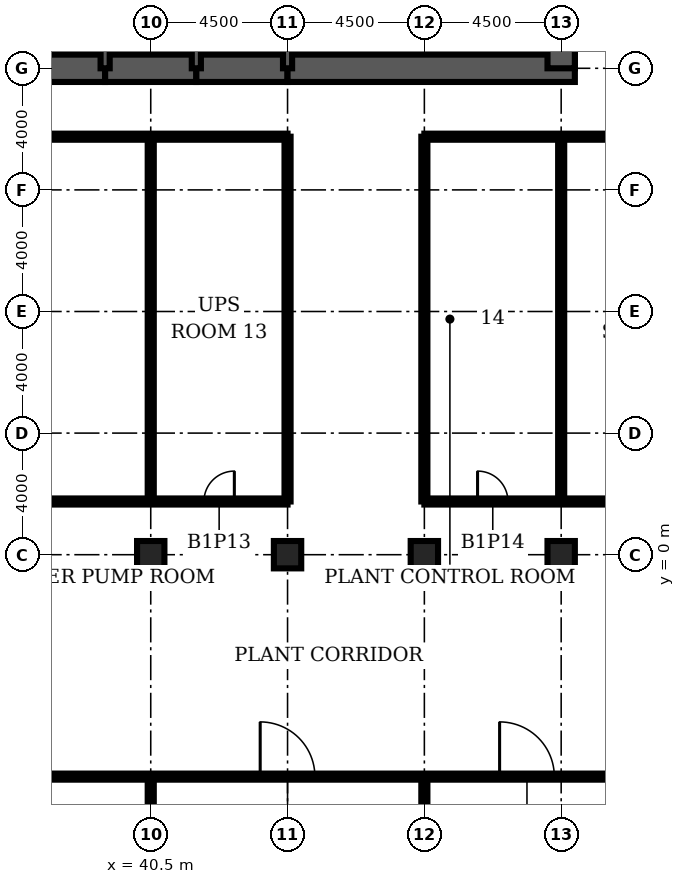
"""IFC4 building model, lengths in metres.
Left out: names, types, materials, properties, quantities, classifications, styles, units other than length and angle.
Written with IfcOpenShell. Run it as: python <this file> out.ifc"""

import sys

from ifc_helpers import new_model, si_unit, direction, frame, frame_2d, origin, origin_2d, place, context, subcontext, project, spatial, rectangle, hollow_rectangle, extrude, element, fill, save


model = new_model("IFC4")
c1 = context("Model", 3, precision=1e-05, world=origin(), true_north=direction((0.0, 1.0)))
c2 = subcontext(c1, "Body", "Model", "MODEL_VIEW")
j1 = project(units=[si_unit("LENGTHUNIT", "METRE"), si_unit("PLANEANGLEUNIT", "RADIAN")], contexts=[c1])
p1 = place(None, origin())
s1 = spatial("IfcSite", under=j1, at=p1, CompositionType="ELEMENT")
p2 = place(p1, origin())
s2 = spatial("IfcBuilding", under=s1, at=p2, CompositionType="ELEMENT")
p3 = place(p2, frame((0.0, 0.0, -6.0)))
s3 = spatial("IfcBuildingStorey", under=s2, at=p3, CompositionType="ELEMENT", Elevation=-6.0)
for number, where, z_axis, x_axis in (
    (1, (40.5, 0.0, 0.0), (0.0, 0.0, 1.0), (0.0, 1.0, 0.0)),
    (2, (45.0, 0.0, 0.0), (0.0, 0.0, 1.0), (0.0, 1.0, 0.0)),
    (3, (49.5, 0.0, 0.0), (0.0, 0.0, 1.0), (0.0, 1.0, 0.0)),
    (4, (54.0, 0.0, 0.0), (0.0, 0.0, 1.0), (0.0, 1.0, 0.0)),
):
    element("IfcColumn", number, at=place(p3, frame(where, z_axis=z_axis, x_axis=x_axis)), inside=s3, PredefinedType="COLUMN", context=c2, shape_type="SweptSolid", body=[
        extrude(hollow_rectangle(XDim=0.9, YDim=0.9, WallThickness=0.12, at=origin_2d()), origin(), (0.0, 0.0, 1.0), 6.0),
    ])
for number, where, z_axis, x_axis in (
    (5, (36.0, 16.0, 0.0), (0.0, 0.0, 1.0), (1.0, 0.0, 0.0)),
    (6, (39.0, 16.0, 0.0), (0.0, 0.0, 1.0), (1.0, 0.0, 0.0)),
    (7, (42.0, 16.0, 0.0), (0.0, 0.0, 1.0), (1.0, 0.0, 0.0)),
):
    element("IfcWall", number, at=place(p3, frame(where, z_axis=z_axis, x_axis=x_axis)), inside=s3, PredefinedType="SHEAR", context=c2, shape_type="SweptSolid", body=[
        extrude(rectangle(XDim=3.0, YDim=0.9, at=frame_2d((1.5, 0.0))), origin(), (0.0, 0.0, 1.0), 6.0),
    ])
p4 = place(p3, frame((45.0, 16.0, 0.0), z_axis=(0.0, 0.0, 1.0), x_axis=(1.0, 0.0, 0.0)))
e8 = element("IfcWall", 8, at=p4, inside=s3, PredefinedType="SHEAR", context=c2, shape_type="SweptSolid", body=[
    extrude(rectangle(XDim=9.45, YDim=0.9, at=frame_2d((4.725, 0.0))), origin(), (0.0, 0.0, 1.0), 6.0),
])
p5 = place(p3, frame((54.0, 16.0, 0.0), z_axis=(0.0, 0.0, 1.0), x_axis=(0.0, 1.0, 0.0)))
e9 = element("IfcWall", 9, at=p5, inside=s3, PredefinedType="SHEAR", context=c2, shape_type="SweptSolid", body=[
    extrude(rectangle(XDim=3.2, YDim=0.9, at=frame_2d((1.6, 0.0))), origin(), (0.0, 0.0, 1.0), 6.0),
])
for number, where, z_axis, x_axis in (
    (10, (39.0, 16.0, 0.0), (0.0, 0.0, 1.0), (0.0, 1.0, 0.0)),
    (11, (42.0, 16.0, 0.0), (0.0, 0.0, 1.0), (0.0, 1.0, 0.0)),
    (12, (45.0, 16.0, 0.0), (0.0, 0.0, 1.0), (0.0, 1.0, 0.0)),
):
    element("IfcWall", number, at=place(p3, frame(where, z_axis=z_axis, x_axis=x_axis)), inside=s3, PredefinedType="SOLIDWALL", context=c2, shape_type="SweptSolid", body=[
        extrude(rectangle(XDim=3.2, YDim=0.3, at=frame_2d((1.6, 0.0))), origin(), (0.0, 0.0, 1.0), 6.0),
    ])
p6 = place(p3, frame((-0.59, -7.3, 0.0), z_axis=(0.0, 0.0, 1.0), x_axis=(1.0, 0.0, 0.0)))
e13 = element("IfcWall", 13, at=p6, inside=s3, PredefinedType="PARTITIONING", context=c2, shape_type="SweptSolid", body=[
    extrude(rectangle(XDim=73.18, YDim=0.2, at=frame_2d((36.59, 0.0))), origin(), (0.0, 0.0, 1.0), 5.7),
])
p7 = place(p6, frame((11.84, 0.0, 0.0)))
e14 = element("IfcOpeningElement", 14, at=p7, cuts=e13, PredefinedType="OPENING", context=c2, shape_type="SweptSolid", body=[
    extrude(rectangle(XDim=1.8, YDim=2.1, at=frame_2d((0.9, 1.05))), frame((0.0, 0.11, 0.0), z_axis=(0.0, -1.0, 0.0), x_axis=(1.0, 0.0, 0.0)), (0.0, 0.0, 1.0), 0.22),
])
p8 = place(p6, frame((64.04, 0.0, 0.0)))
e15 = element("IfcOpeningElement", 15, at=p8, cuts=e13, PredefinedType="OPENING", context=c2, shape_type="SweptSolid", body=[
    extrude(rectangle(XDim=1.8, YDim=2.1, at=frame_2d((0.9, 1.05))), frame((0.0, 0.11, 0.0), z_axis=(0.0, -1.0, 0.0), x_axis=(1.0, 0.0, 0.0)), (0.0, 0.0, 1.0), 0.22),
])
p9 = place(p6, frame((15.44, 0.0, 0.0)))
e16 = element("IfcOpeningElement", 16, at=p9, cuts=e13, PredefinedType="OPENING", context=c2, shape_type="SweptSolid", body=[
    extrude(rectangle(XDim=1.8, YDim=2.1, at=frame_2d((0.9, 1.05))), frame((0.0, 0.11, 0.0), z_axis=(0.0, -1.0, 0.0), x_axis=(1.0, 0.0, 0.0)), (0.0, 0.0, 1.0), 0.22),
])
p10 = place(p6, frame((19.04, 0.0, 0.0)))
e17 = element("IfcOpeningElement", 17, at=p10, cuts=e13, PredefinedType="OPENING", context=c2, shape_type="SweptSolid", body=[
    extrude(rectangle(XDim=1.8, YDim=2.1, at=frame_2d((0.9, 1.05))), frame((0.0, 0.11, 0.0), z_axis=(0.0, -1.0, 0.0), x_axis=(1.0, 0.0, 0.0)), (0.0, 0.0, 1.0), 0.22),
])
p11 = place(p6, frame((35.69, 0.0, 0.0)))
e18 = element("IfcOpeningElement", 18, at=p11, cuts=e13, PredefinedType="OPENING", context=c2, shape_type="SweptSolid", body=[
    extrude(rectangle(XDim=1.8, YDim=2.1, at=frame_2d((0.9, 1.05))), frame((0.0, 0.11, 0.0), z_axis=(0.0, -1.0, 0.0), x_axis=(1.0, 0.0, 0.0)), (0.0, 0.0, 1.0), 0.22),
])
p12 = place(p6, frame((44.69, 0.0, 0.0)))
e19 = element("IfcOpeningElement", 19, at=p12, cuts=e13, PredefinedType="OPENING", context=c2, shape_type="SweptSolid", body=[
    extrude(rectangle(XDim=1.8, YDim=2.1, at=frame_2d((0.9, 1.05))), frame((0.0, 0.11, 0.0), z_axis=(0.0, -1.0, 0.0), x_axis=(1.0, 0.0, 0.0)), (0.0, 0.0, 1.0), 0.22),
])
p13 = place(p6, frame((52.565, 0.0, 0.0)))
e20 = element("IfcOpeningElement", 20, at=p13, cuts=e13, PredefinedType="OPENING", context=c2, shape_type="SweptSolid", body=[
    extrude(rectangle(XDim=1.8, YDim=2.1, at=frame_2d((0.9, 1.05))), frame((0.0, 0.11, 0.0), z_axis=(0.0, -1.0, 0.0), x_axis=(1.0, 0.0, 0.0)), (0.0, 0.0, 1.0), 0.22),
])
p14 = place(p6, frame((59.315, 0.0, 0.0)))
e21 = element("IfcOpeningElement", 21, at=p14, cuts=e13, PredefinedType="OPENING", context=c2, shape_type="SweptSolid", body=[
    extrude(rectangle(XDim=1.8, YDim=2.1, at=frame_2d((0.9, 1.05))), frame((0.0, 0.11, 0.0), z_axis=(0.0, -1.0, 0.0), x_axis=(1.0, 0.0, 0.0)), (0.0, 0.0, 1.0), 0.22),
])
p15 = place(p3, frame((31.5, 1.75, 0.0), z_axis=(0.0, 0.0, 1.0), x_axis=(1.0, 0.0, 0.0)))
e22 = element("IfcWall", 22, at=p15, inside=s3, PredefinedType="PARTITIONING", context=c2, shape_type="SweptSolid", body=[
    extrude(rectangle(XDim=13.5, YDim=0.2, at=frame_2d((6.75, 0.0))), origin(), (0.0, 0.0, 1.0), 5.7),
])
p16 = place(p15, frame((3.6, 0.0, 0.0)))
e23 = element("IfcOpeningElement", 23, at=p16, cuts=e22, PredefinedType="OPENING", context=c2, shape_type="SweptSolid", body=[
    extrude(rectangle(XDim=1.8, YDim=2.1, at=frame_2d((0.9, 1.05))), frame((0.0, 0.11, 0.0), z_axis=(0.0, -1.0, 0.0), x_axis=(1.0, 0.0, 0.0)), (0.0, 0.0, 1.0), 0.22),
])
p17 = place(p15, frame((10.75, 0.0, 0.0)))
e24 = element("IfcOpeningElement", 24, at=p17, cuts=e22, PredefinedType="OPENING", context=c2, shape_type="SweptSolid", body=[
    extrude(rectangle(XDim=1.0, YDim=2.1, at=frame_2d((0.5, 1.05))), frame((0.0, 0.11, 0.0), z_axis=(0.0, -1.0, 0.0), x_axis=(1.0, 0.0, 0.0)), (0.0, 0.0, 1.0), 0.22),
])
p18 = place(p3, frame((49.5, 1.75, 0.0), z_axis=(0.0, 0.0, 1.0), x_axis=(1.0, 0.0, 0.0)))
e25 = element("IfcWall", 25, at=p18, inside=s3, PredefinedType="PARTITIONING", context=c2, shape_type="SweptSolid", body=[
    extrude(rectangle(XDim=23.09, YDim=0.2, at=frame_2d((11.545, 0.0))), origin(), (0.0, 0.0, 1.0), 5.7),
])
p19 = place(p18, frame((1.75, 0.0, 0.0)))
e26 = element("IfcOpeningElement", 26, at=p19, cuts=e25, PredefinedType="OPENING", context=c2, shape_type="SweptSolid", body=[
    extrude(rectangle(XDim=1.0, YDim=2.1, at=frame_2d((0.5, 1.05))), frame((0.0, 0.11, 0.0), z_axis=(0.0, -1.0, 0.0), x_axis=(1.0, 0.0, 0.0)), (0.0, 0.0, 1.0), 0.22),
])
p20 = place(p18, frame((6.6, 0.0, 0.0)))
e27 = element("IfcOpeningElement", 27, at=p20, cuts=e25, PredefinedType="OPENING", context=c2, shape_type="SweptSolid", body=[
    extrude(rectangle(XDim=1.8, YDim=2.1, at=frame_2d((0.9, 1.05))), frame((0.0, 0.11, 0.0), z_axis=(0.0, -1.0, 0.0), x_axis=(1.0, 0.0, 0.0)), (0.0, 0.0, 1.0), 0.22),
])
p21 = place(p18, frame((10.95, 0.0, 0.0)))
e28 = element("IfcOpeningElement", 28, at=p21, cuts=e25, PredefinedType="OPENING", context=c2, shape_type="SweptSolid", body=[
    extrude(rectangle(XDim=1.8, YDim=2.1, at=frame_2d((0.9, 1.05))), frame((0.0, 0.11, 0.0), z_axis=(0.0, -1.0, 0.0), x_axis=(1.0, 0.0, 0.0)), (0.0, 0.0, 1.0), 0.22),
])
p22 = place(p3, frame((31.5, 13.75, 0.0), z_axis=(0.0, 0.0, 1.0), x_axis=(1.0, 0.0, 0.0)))
e29 = element("IfcWall", 29, at=p22, inside=s3, PredefinedType="PARTITIONING", context=c2, shape_type="SweptSolid", body=[
    extrude(rectangle(XDim=13.5, YDim=0.2, at=frame_2d((6.75, 0.0))), origin(), (0.0, 0.0, 1.0), 5.7),
])
p23 = place(p3, frame((49.5, 13.75, 0.0), z_axis=(0.0, 0.0, 1.0), x_axis=(1.0, 0.0, 0.0)))
e30 = element("IfcWall", 30, at=p23, inside=s3, PredefinedType="PARTITIONING", context=c2, shape_type="SweptSolid", body=[
    extrude(rectangle(XDim=23.09, YDim=0.2, at=frame_2d((11.545, 0.0))), origin(), (0.0, 0.0, 1.0), 5.7),
])
p24 = place(p3, frame((40.5, -21.29, 0.0), z_axis=(0.0, 0.0, 1.0), x_axis=(0.0, 1.0, 0.0)))
e31 = element("IfcWall", 31, at=p24, inside=s3, PredefinedType="PARTITIONING", context=c2, shape_type="SweptSolid", body=[
    extrude(rectangle(XDim=13.99, YDim=0.2, at=frame_2d((6.995, 0.0))), origin(), (0.0, 0.0, 1.0), 4.984),
])
for number, where, z_axis, x_axis in (
    (32, (40.5, 1.75, 0.0), (0.0, 0.0, 1.0), (0.0, 1.0, 0.0)),
    (33, (45.0, 1.75, 0.0), (0.0, 0.0, 1.0), (0.0, 1.0, 0.0)),
):
    element("IfcWall", number, at=place(p3, frame(where, z_axis=z_axis, x_axis=x_axis)), inside=s3, PredefinedType="PARTITIONING", context=c2, shape_type="SweptSolid", body=[
        extrude(rectangle(XDim=12.0, YDim=0.2, at=frame_2d((6.0, 0.0))), origin(), (0.0, 0.0, 1.0), 5.7),
    ])
p25 = place(p3, frame((49.5, -21.29, 0.0), z_axis=(0.0, 0.0, 1.0), x_axis=(0.0, 1.0, 0.0)))
e34 = element("IfcWall", 34, at=p25, inside=s3, PredefinedType="PARTITIONING", context=c2, shape_type="SweptSolid", body=[
    extrude(rectangle(XDim=13.99, YDim=0.2, at=frame_2d((6.995, 0.0))), origin(), (0.0, 0.0, 1.0), 4.984),
])
for number, where, z_axis, x_axis in (
    (35, (49.5, 1.75, 0.0), (0.0, 0.0, 1.0), (0.0, 1.0, 0.0)),
    (36, (54.0, 1.75, 0.0), (0.0, 0.0, 1.0), (0.0, 1.0, 0.0)),
):
    element("IfcWall", number, at=place(p3, frame(where, z_axis=z_axis, x_axis=x_axis)), inside=s3, PredefinedType="PARTITIONING", context=c2, shape_type="SweptSolid", body=[
        extrude(rectangle(XDim=12.0, YDim=0.2, at=frame_2d((6.0, 0.0))), origin(), (0.0, 0.0, 1.0), 5.7),
    ])
p26 = place(p12, origin())
e37 = element("IfcDoor", 37, at=p26, inside=s3, OperationType="SINGLE_SWING_LEFT", PredefinedType="DOOR", context=c2, shape_type="SweptSolid", body=[
    extrude(rectangle(XDim=1.8, YDim=2.1, at=frame_2d((0.9, 1.05))), frame((0.0, 0.025, 0.0), z_axis=(0.0, -1.0, 0.0), x_axis=(1.0, 0.0, 0.0)), (0.0, 0.0, 1.0), 0.05),
])
fill(e19, e37)
p27 = place(p13, origin())
e38 = element("IfcDoor", 38, at=p27, inside=s3, OperationType="SINGLE_SWING_LEFT", PredefinedType="DOOR", context=c2, shape_type="SweptSolid", body=[
    extrude(rectangle(XDim=1.8, YDim=2.1, at=frame_2d((0.9, 1.05))), frame((0.0, 0.025, 0.0), z_axis=(0.0, -1.0, 0.0), x_axis=(1.0, 0.0, 0.0)), (0.0, 0.0, 1.0), 0.05),
])
fill(e20, e38)
p28 = place(p17, origin())
e39 = element("IfcDoor", 39, at=p28, inside=s3, OperationType="SINGLE_SWING_RIGHT", PredefinedType="DOOR", context=c2, shape_type="SweptSolid", body=[
    extrude(rectangle(XDim=1.0, YDim=2.1, at=frame_2d((0.5, 1.05))), frame((0.0, 0.025, 0.0), z_axis=(0.0, -1.0, 0.0), x_axis=(1.0, 0.0, 0.0)), (0.0, 0.0, 1.0), 0.05),
])
fill(e24, e39)
p29 = place(p19, origin())
e40 = element("IfcDoor", 40, at=p29, inside=s3, OperationType="SINGLE_SWING_LEFT", PredefinedType="DOOR", context=c2, shape_type="SweptSolid", body=[
    extrude(rectangle(XDim=1.0, YDim=2.1, at=frame_2d((0.5, 1.05))), frame((0.0, 0.025, 0.0), z_axis=(0.0, -1.0, 0.0), x_axis=(1.0, 0.0, 0.0)), (0.0, 0.0, 1.0), 0.05),
])
fill(e26, e40)
save(model, sys.argv[1])
